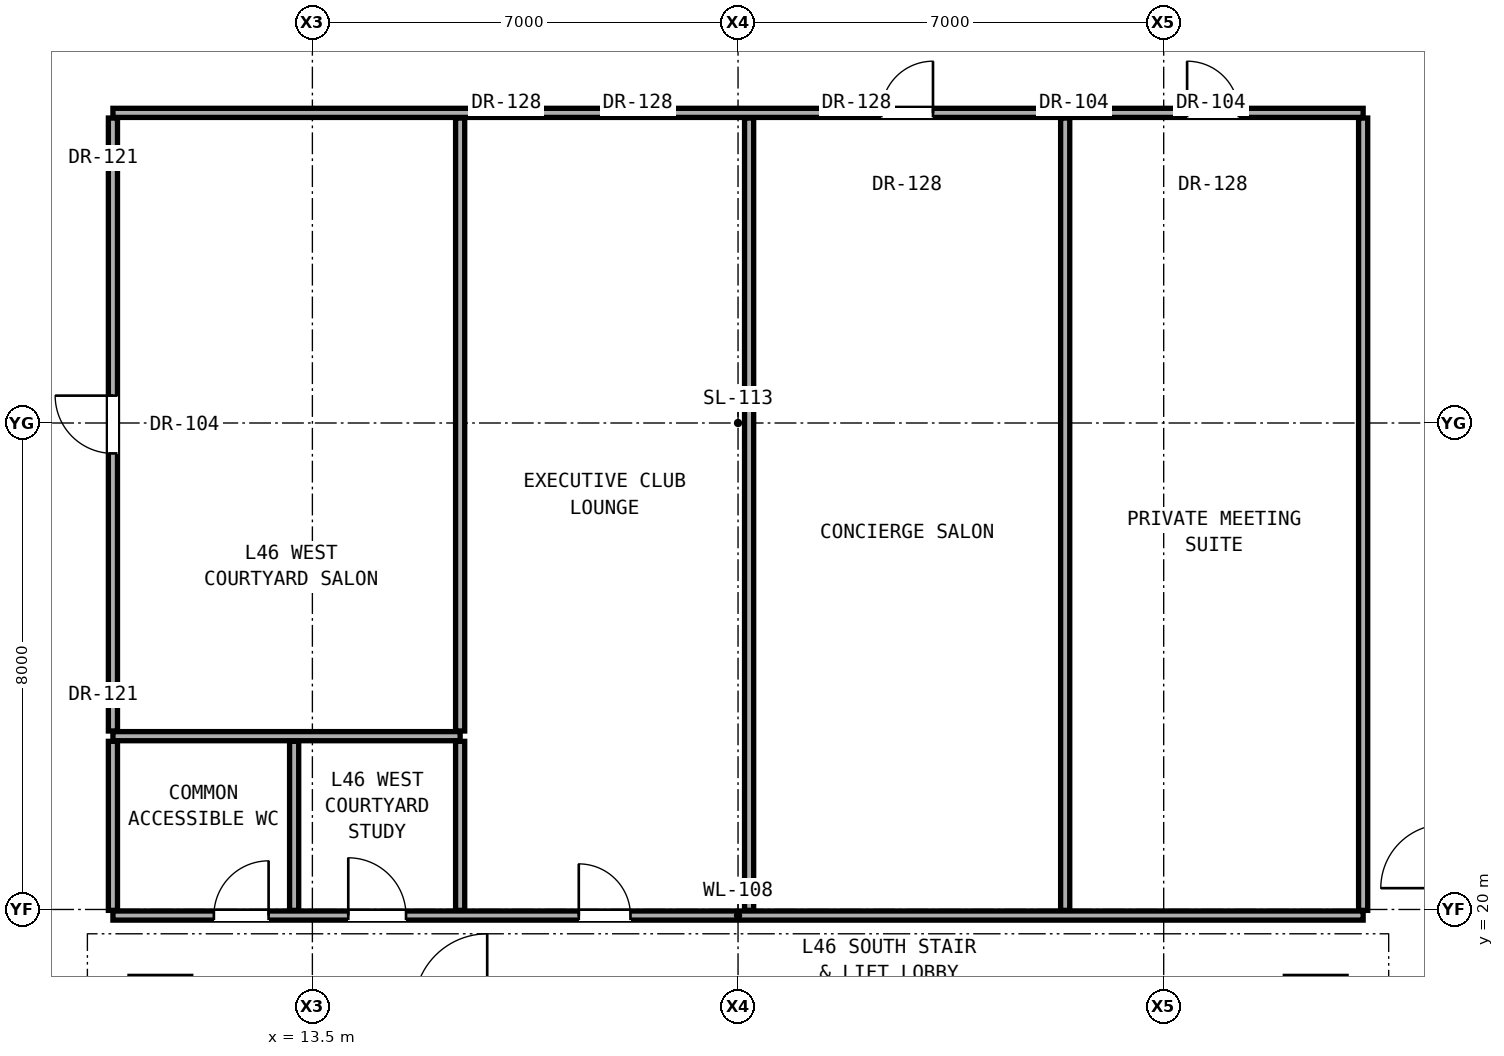
"""IFC4 building model, lengths in metres.
Left out: names, types, materials, properties, quantities, classifications, styles, units other than length and angle.
Written with IfcOpenShell. Run it as: python <this file> out.ifc"""

import sys

from ifc_helpers import new_model, si_unit, direction, frame, frame_2d, origin, place, context, subcontext, project, spatial, rectangle, extrude, element, fill, save


model = new_model("IFC4")
c1 = context("Model", 3, precision=1e-05, world=origin(), true_north=direction((0.0, 1.0)))
c2 = subcontext(c1, "Body", "Model", "MODEL_VIEW")
j1 = project(units=[si_unit("LENGTHUNIT", "METRE"), si_unit("PLANEANGLEUNIT", "RADIAN")], contexts=[c1])
p1 = place(None, origin())
s1 = spatial("IfcSite", under=j1, at=p1, CompositionType="ELEMENT")
p2 = place(p1, origin())
s2 = spatial("IfcBuilding", under=s1, at=p2, CompositionType="ELEMENT")
p3 = place(p2, frame((0.0, 0.0, 164.15)))
s3 = spatial("IfcBuildingStorey", under=s2, at=p3, CompositionType="ELEMENT", Elevation=164.15)
p4 = place(p3, frame((10.22, 19.9, 0.0), z_axis=(0.0, 0.0, 1.0), x_axis=(1.0, 0.0, 0.0)))
e1 = element("IfcWall", 1, at=p4, inside=s3, PredefinedType="PARTITIONING", context=c2, shape_type="SweptSolid", body=[
    extrude(rectangle(XDim=20.56, YDim=0.15, at=frame_2d((10.28, 0.0))), origin(), (0.0, 0.0, 1.0), 2.186),
])
p5 = place(p4, frame((1.66, 0.0, 0.0)))
e2 = element("IfcOpeningElement", 2, at=p5, cuts=e1, PredefinedType="OPENING", context=c2, shape_type="SweptSolid", body=[
    extrude(rectangle(XDim=0.9, YDim=2.1, at=frame_2d((0.45, 1.05))), frame((0.0, 0.085, 0.0), z_axis=(0.0, -1.0, 0.0), x_axis=(1.0, 0.0, 0.0)), (0.0, 0.0, 1.0), 0.17),
])
p6 = place(p4, frame((3.87, 0.0, 0.0)))
e3 = element("IfcOpeningElement", 3, at=p6, cuts=e1, PredefinedType="OPENING", context=c2, shape_type="SweptSolid", body=[
    extrude(rectangle(XDim=0.95, YDim=2.15, at=frame_2d((0.475, 1.075))), frame((0.0, 0.085, 0.0), z_axis=(0.0, -1.0, 0.0), x_axis=(1.0, 0.0, 0.0)), (0.0, 0.0, 1.0), 0.17),
])
p7 = place(p4, frame((7.661, 0.0, 0.0)))
e4 = element("IfcOpeningElement", 4, at=p7, cuts=e1, PredefinedType="OPENING", context=c2, shape_type="SweptSolid", body=[
    extrude(rectangle(XDim=0.85, YDim=2.01, at=frame_2d((0.425, 1.005))), frame((0.0, 0.085, 0.0), z_axis=(0.0, -1.0, 0.0), x_axis=(1.0, 0.0, 0.0)), (0.0, 0.0, 1.0), 0.17),
])
p8 = place(p3, frame((10.22, 22.85, 0.0), z_axis=(0.0, 0.0, 1.0), x_axis=(1.0, 0.0, 0.0)))
e5 = element("IfcWall", 5, at=p8, inside=s3, PredefinedType="PARTITIONING", context=c2, shape_type="SweptSolid", body=[
    extrude(rectangle(XDim=5.71, YDim=0.15, at=frame_2d((2.855, 0.0))), origin(), (0.0, 0.0, 1.0), 2.186),
])
p9 = place(p3, frame((10.22, 33.1, 0.0), z_axis=(0.0, 0.0, 1.0), x_axis=(1.0, 0.0, 0.0)))
e6 = element("IfcWall", 6, at=p9, inside=s3, PredefinedType="PARTITIONING", context=c2, shape_type="SweptSolid", body=[
    extrude(rectangle(XDim=20.56, YDim=0.15, at=frame_2d((10.28, 0.0))), origin(), (0.0, 0.0, 1.0), 2.186),
])
p10 = place(p9, frame((12.636, 0.0, 0.0)))
e7 = element("IfcOpeningElement", 7, at=p10, cuts=e6, PredefinedType="OPENING", context=c2, shape_type="SweptSolid", body=[
    extrude(rectangle(XDim=0.85, YDim=2.01, at=frame_2d((0.425, 1.005))), frame((0.0, 0.085, 0.0), z_axis=(0.0, -1.0, 0.0), x_axis=(1.0, 0.0, 0.0)), (0.0, 0.0, 1.0), 0.17),
])
p11 = place(p9, frame((17.665, 0.0, 0.0)))
e8 = element("IfcOpeningElement", 8, at=p11, cuts=e6, PredefinedType="OPENING", context=c2, shape_type="SweptSolid", body=[
    extrude(rectangle(XDim=0.85, YDim=2.01, at=frame_2d((0.425, 1.005))), frame((0.0, 0.085, 0.0), z_axis=(0.0, -1.0, 0.0), x_axis=(1.0, 0.0, 0.0)), (0.0, 0.0, 1.0), 0.17),
])
p12 = place(p3, frame((10.22, 19.985, 0.0), z_axis=(0.0, 0.0, 1.0), x_axis=(0.0, 1.0, 0.0)))
e9 = element("IfcWall", 9, at=p12, inside=s3, PredefinedType="PARTITIONING", context=c2, shape_type="SweptSolid", body=[
    extrude(rectangle(XDim=2.78, YDim=0.15, at=frame_2d((1.39, 0.0))), origin(), (0.0, 0.0, 1.0), 3.05),
])
p13 = place(p3, frame((10.22, 22.935, 0.0), z_axis=(0.0, 0.0, 1.0), x_axis=(0.0, 1.0, 0.0)))
e10 = element("IfcWall", 10, at=p13, inside=s3, PredefinedType="PARTITIONING", context=c2, shape_type="SweptSolid", body=[
    extrude(rectangle(XDim=10.08, YDim=0.15, at=frame_2d((5.04, 0.0))), origin(), (0.0, 0.0, 1.0), 2.346),
])
p14 = place(p13, frame((4.565, 0.0, 0.0)))
e11 = element("IfcOpeningElement", 11, at=p14, cuts=e10, PredefinedType="OPENING", context=c2, shape_type="SweptSolid", body=[
    extrude(rectangle(XDim=0.95, YDim=2.15, at=frame_2d((0.475, 1.075))), frame((0.0, 0.085, 0.0), z_axis=(0.0, -1.0, 0.0), x_axis=(1.0, 0.0, 0.0)), (0.0, 0.0, 1.0), 0.17),
])
for number, where, z_axis, x_axis in (
    (12, (13.2, 19.985, 0.0), (0.0, 0.0, 1.0), (0.0, 1.0, 0.0)),
    (13, (15.93, 19.985, 0.0), (0.0, 0.0, 1.0), (0.0, 1.0, 0.0)),
):
    element("IfcWall", number, at=place(p3, frame(where, z_axis=z_axis, x_axis=x_axis)), inside=s3, PredefinedType="PARTITIONING", context=c2, shape_type="SweptSolid", body=[
        extrude(rectangle(XDim=2.78, YDim=0.15, at=frame_2d((1.39, 0.0))), origin(), (0.0, 0.0, 1.0), 3.05),
    ])
p15 = place(p3, frame((15.93, 22.935, 0.0), z_axis=(0.0, 0.0, 1.0), x_axis=(0.0, 1.0, 0.0)))
e14 = element("IfcWall", 14, at=p15, inside=s3, PredefinedType="PARTITIONING", context=c2, shape_type="SweptSolid", body=[
    extrude(rectangle(XDim=10.08, YDim=0.15, at=frame_2d((5.04, 0.0))), origin(), (0.0, 0.0, 1.0), 2.186),
])
for number, where, z_axis, x_axis in (
    (15, (20.682, 19.985, 0.0), (0.0, 0.0, 1.0), (0.0, 1.0, 0.0)),
    (16, (25.88, 19.985, 0.0), (0.0, 0.0, 1.0), (0.0, 1.0, 0.0)),
):
    element("IfcWall", number, at=place(p3, frame(where, z_axis=z_axis, x_axis=x_axis)), inside=s3, PredefinedType="PARTITIONING", context=c2, shape_type="SweptSolid", body=[
        extrude(rectangle(XDim=13.03, YDim=0.15, at=frame_2d((6.515, 0.0))), origin(), (0.0, 0.0, 1.0), 2.186),
    ])
p16 = place(p3, frame((30.78, 19.985, 0.0), z_axis=(0.0, 0.0, 1.0), x_axis=(0.0, 1.0, 0.0)))
e17 = element("IfcWall", 17, at=p16, inside=s3, PredefinedType="PARTITIONING", context=c2, shape_type="SweptSolid", body=[
    extrude(rectangle(XDim=13.03, YDim=0.15, at=frame_2d((6.515, 0.0))), origin(), (0.0, 0.0, 1.0), 2.346),
])
p17 = place(p5, origin())
e18 = element("IfcDoor", 18, at=p17, inside=s3, OperationType="SINGLE_SWING_RIGHT", PredefinedType="DOOR", context=c2, shape_type="SweptSolid", body=[
    extrude(rectangle(XDim=0.9, YDim=2.1, at=frame_2d((0.45, 1.05))), frame((0.0, 0.025, 0.0), z_axis=(0.0, -1.0, 0.0), x_axis=(1.0, 0.0, 0.0)), (0.0, 0.0, 1.0), 0.05),
])
fill(e2, e18)
p18 = place(p6, origin())
e19 = element("IfcDoor", 19, at=p18, inside=s3, OperationType="SINGLE_SWING_LEFT", PredefinedType="DOOR", context=c2, shape_type="SweptSolid", body=[
    extrude(rectangle(XDim=0.95, YDim=2.15, at=frame_2d((0.475, 1.075))), frame((0.0, 0.025, 0.0), z_axis=(0.0, -1.0, 0.0), x_axis=(1.0, 0.0, 0.0)), (0.0, 0.0, 1.0), 0.05),
])
fill(e3, e19)
p19 = place(p14, origin())
e20 = element("IfcDoor", 20, at=p19, inside=s3, OperationType="SINGLE_SWING_RIGHT", PredefinedType="DOOR", context=c2, shape_type="SweptSolid", body=[
    extrude(rectangle(XDim=0.95, YDim=2.15, at=frame_2d((0.475, 1.075))), frame((0.0, 0.025, 0.0), z_axis=(0.0, -1.0, 0.0), x_axis=(1.0, 0.0, 0.0)), (0.0, 0.0, 1.0), 0.05),
])
fill(e11, e20)
p20 = place(p7, origin())
e21 = element("IfcDoor", 21, at=p20, inside=s3, OperationType="SINGLE_SWING_LEFT", PredefinedType="DOOR", context=c2, shape_type="SweptSolid", body=[
    extrude(rectangle(XDim=0.85, YDim=2.01, at=frame_2d((0.425, 1.005))), frame((0.0, 0.025, 0.0), z_axis=(0.0, -1.0, 0.0), x_axis=(1.0, 0.0, 0.0)), (0.0, 0.0, 1.0), 0.05),
])
fill(e4, e21)
p21 = place(p10, origin())
e22 = element("IfcDoor", 22, at=p21, inside=s3, OperationType="SINGLE_SWING_RIGHT", PredefinedType="DOOR", context=c2, shape_type="SweptSolid", body=[
    extrude(rectangle(XDim=0.85, YDim=2.01, at=frame_2d((0.425, 1.005))), frame((0.0, 0.025, 0.0), z_axis=(0.0, -1.0, 0.0), x_axis=(1.0, 0.0, 0.0)), (0.0, 0.0, 1.0), 0.05),
])
fill(e7, e22)
p22 = place(p11, origin())
e23 = element("IfcDoor", 23, at=p22, inside=s3, OperationType="SINGLE_SWING_LEFT", PredefinedType="DOOR", context=c2, shape_type="SweptSolid", body=[
    extrude(rectangle(XDim=0.85, YDim=2.01, at=frame_2d((0.425, 1.005))), frame((0.0, 0.025, 0.0), z_axis=(0.0, -1.0, 0.0), x_axis=(1.0, 0.0, 0.0)), (0.0, 0.0, 1.0), 0.05),
])
fill(e8, e23)
save(model, sys.argv[1])
